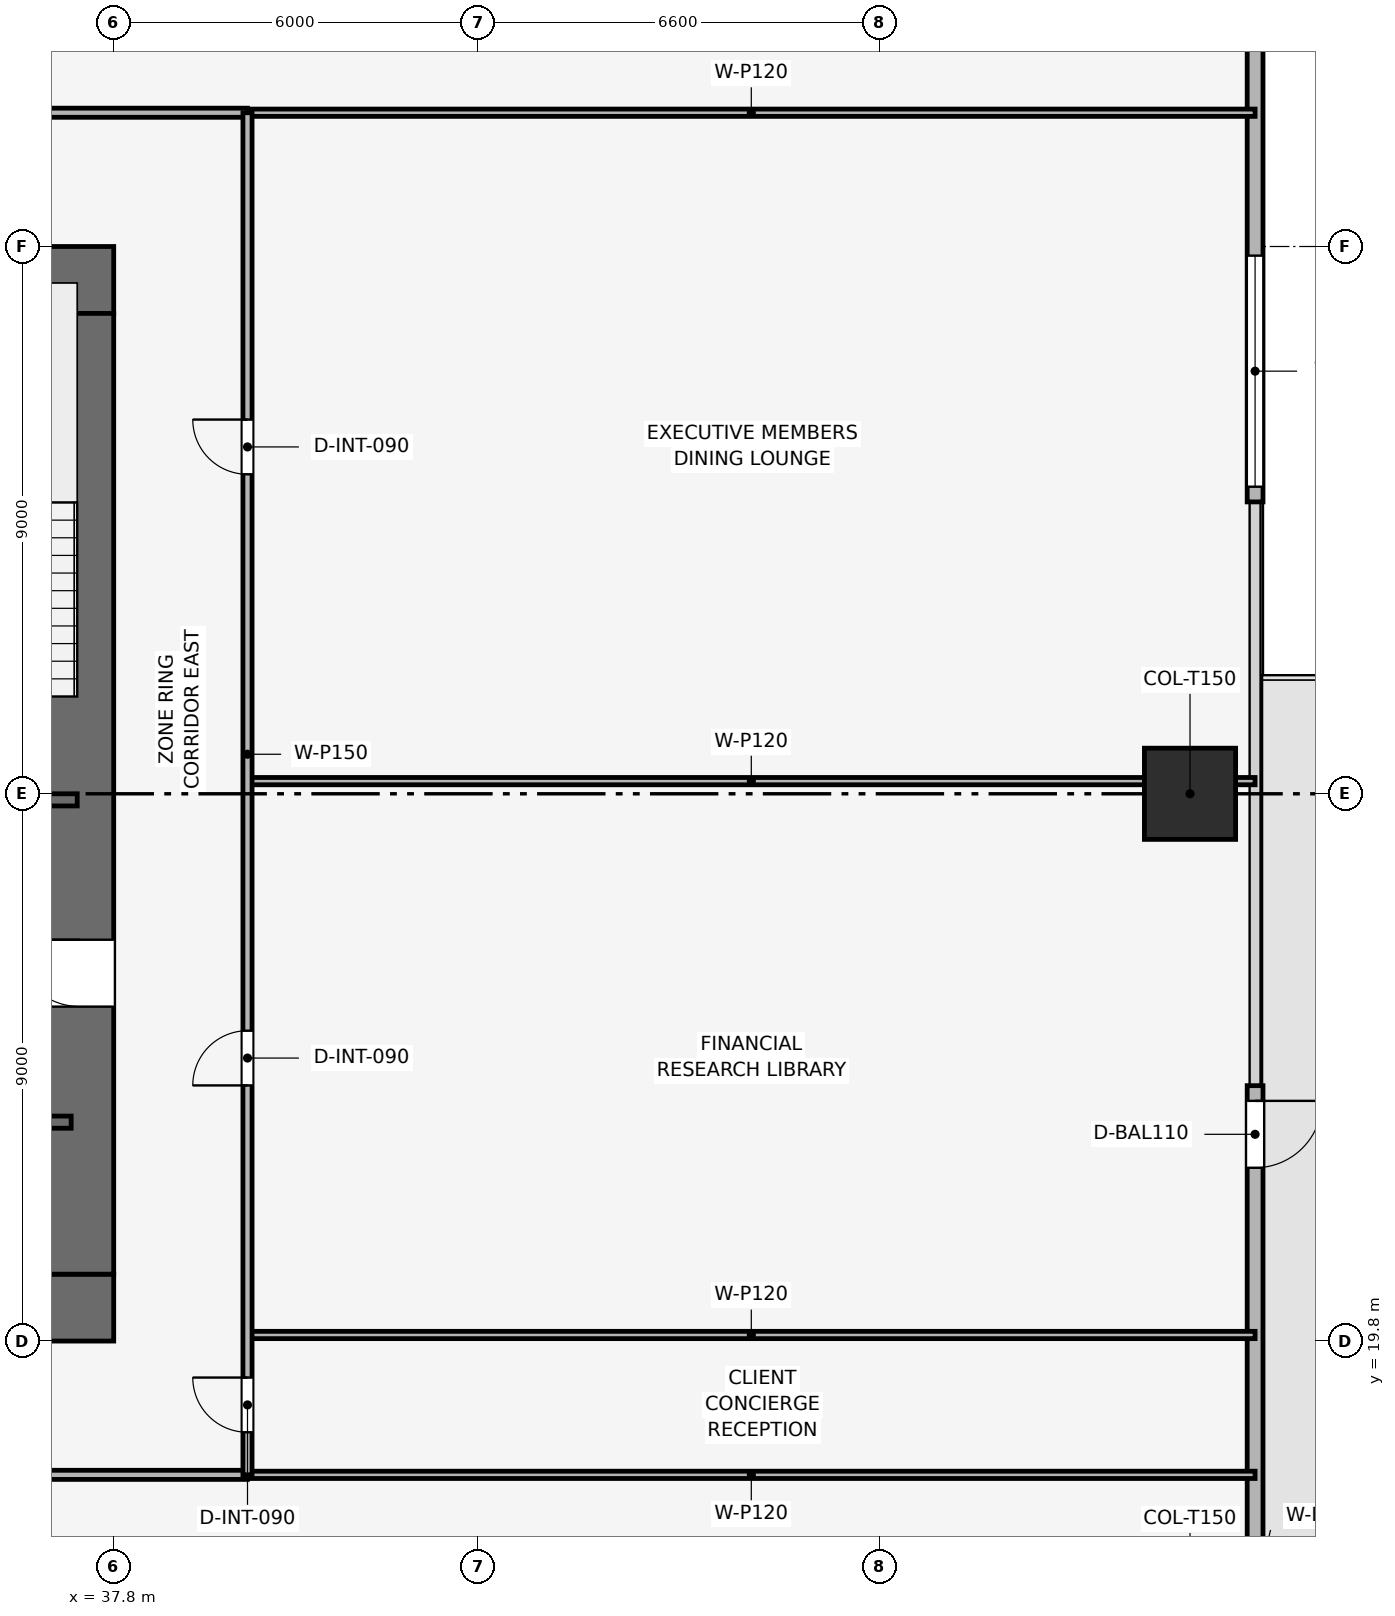
"""IFC4 building model, lengths in metres.
Left out: names, types, materials, properties, quantities, classifications, styles, units other than length and angle.
Written with IfcOpenShell. Run it as: python <this file> out.ifc"""

import sys

from ifc_helpers import new_model, si_unit, direction, frame, frame_2d, origin, origin_2d, place, context, subcontext, project, spatial, rectangle, extrude, element, fill, save


model = new_model("IFC4")
c1 = context("Model", 3, precision=1e-05, world=origin(), true_north=direction((0.0, 1.0)))
c2 = subcontext(c1, "Body", "Model", "MODEL_VIEW")
j1 = project(units=[si_unit("LENGTHUNIT", "METRE"), si_unit("PLANEANGLEUNIT", "RADIAN")], contexts=[c1])
p1 = place(None, origin())
s1 = spatial("IfcSite", under=j1, at=p1, CompositionType="ELEMENT")
p2 = place(p1, origin())
s2 = spatial("IfcBuilding", under=s1, at=p2, CompositionType="ELEMENT")
p3 = place(p2, frame((0.0, 0.0, 30.0)))
s3 = spatial("IfcBuildingStorey", under=s2, at=p3, CompositionType="ELEMENT", Elevation=30.0)
p4 = place(p3, frame((19.8, 20.35, 0.0), z_axis=(0.0, 0.0, 1.0), x_axis=(1.0, 0.0, 0.0)))
e1 = element("IfcWall", 1, at=p4, inside=s3, PredefinedType="SHEAR", context=c2, shape_type="SweptSolid", body=[
    extrude(rectangle(XDim=18.0, YDim=1.1, at=frame_2d((9.0, 0.0))), origin(), (0.0, 0.0, 1.0), 3.9),
])
p5 = place(p4, frame((8.4, 0.0, 0.0)))
e2 = element("IfcOpeningElement", 2, at=p5, cuts=e1, PredefinedType="OPENING", context=c2, shape_type="SweptSolid", body=[
    extrude(rectangle(XDim=1.2, YDim=2.2, at=frame_2d((0.6, 1.1))), frame((0.0, 0.56, 0.0), z_axis=(0.0, -1.0, 0.0), x_axis=(1.0, 0.0, 0.0)), (0.0, 0.0, 1.0), 1.12),
])
p6 = place(p3, frame((19.8, 37.25, 0.0), z_axis=(0.0, 0.0, 1.0), x_axis=(1.0, 0.0, 0.0)))
e3 = element("IfcWall", 3, at=p6, inside=s3, PredefinedType="SHEAR", context=c2, shape_type="SweptSolid", body=[
    extrude(rectangle(XDim=18.0, YDim=1.1, at=frame_2d((9.0, 0.0))), origin(), (0.0, 0.0, 1.0), 3.9),
])
p7 = place(p6, frame((7.05, 0.0, 0.0)))
e4 = element("IfcOpeningElement", 4, at=p7, cuts=e3, PredefinedType="OPENING", context=c2, shape_type="SweptSolid", body=[
    extrude(rectangle(XDim=1.1, YDim=2.15, at=frame_2d((0.55, 1.075))), frame((0.0, 0.56, 0.0), z_axis=(0.0, -1.0, 0.0), x_axis=(1.0, 0.0, 0.0)), (0.0, 0.0, 1.0), 1.12),
])
p8 = place(p3, frame((37.25, 20.9, 0.0), z_axis=(0.0, 0.0, 1.0), x_axis=(0.0, 1.0, 0.0)))
e5 = element("IfcWall", 5, at=p8, inside=s3, PredefinedType="SHEAR", context=c2, shape_type="SweptSolid", body=[
    extrude(rectangle(XDim=15.8, YDim=1.1, at=frame_2d((7.9, 0.0))), origin(), (0.0, 0.0, 1.0), 3.9),
])
p9 = place(p8, frame((4.4, 0.0, 0.0)))
e6 = element("IfcOpeningElement", 6, at=p9, cuts=e5, PredefinedType="OPENING", context=c2, shape_type="SweptSolid", body=[
    extrude(rectangle(XDim=1.1, YDim=2.15, at=frame_2d((0.55, 1.075))), frame((0.0, 0.56, 0.0), z_axis=(0.0, -1.0, 0.0), x_axis=(1.0, 0.0, 0.0)), (0.0, 0.0, 1.0), 1.12),
])
p10 = place(p3, frame((55.5, 28.8, 0.003), z_axis=(0.0, 0.0, 1.0), x_axis=(1.0, 0.0, 0.0)))
e7 = element("IfcColumn", 7, at=p10, inside=s3, PredefinedType="COLUMN", context=c2, shape_type="SweptSolid", body=[
    extrude(rectangle(XDim=1.5, YDim=1.5, at=origin_2d()), origin(), (0.0, 0.0, 1.0), 3.644),
])
p11 = place(p3, frame((56.57, 48.9, 0.0), z_axis=(0.0, 0.0, 1.0), x_axis=(0.0, -1.0, 0.0)))
e8 = element("IfcWall", 8, at=p11, inside=s3, PredefinedType="SOLIDWALL", context=c2, shape_type="SweptSolid", body=[
    extrude(rectangle(XDim=15.3, YDim=0.26, at=frame_2d((7.65, 0.0))), origin(), (0.0, 0.0, 1.0), 3.65),
])
p12 = place(p11, frame((11.25, 0.0, 0.9)))
e9 = element("IfcOpeningElement", 9, at=p12, cuts=e8, PredefinedType="OPENING", context=c2, shape_type="SweptSolid", body=[
    extrude(rectangle(XDim=3.8, YDim=1.9, at=frame_2d((1.9, 0.95))), frame((0.0, 0.14, 0.0), z_axis=(0.0, -1.0, 0.0), x_axis=(1.0, 0.0, 0.0)), (0.0, 0.0, 1.0), 0.28),
])
p13 = place(p3, frame((56.57, 24.0, 0.0), z_axis=(0.0, 0.0, 1.0), x_axis=(0.0, -1.0, 0.0)))
e10 = element("IfcWall", 10, at=p13, inside=s3, PredefinedType="SOLIDWALL", context=c2, shape_type="SweptSolid", body=[
    extrude(rectangle(XDim=15.3, YDim=0.26, at=frame_2d((7.65, 0.0))), origin(), (0.0, 0.0, 1.0), 3.65),
])
p14 = place(p13, frame((0.25, 0.0, 0.0)))
e11 = element("IfcOpeningElement", 11, at=p14, cuts=e10, PredefinedType="OPENING", context=c2, shape_type="SweptSolid", body=[
    extrude(rectangle(XDim=1.1, YDim=2.2, at=frame_2d((0.55, 1.1))), frame((0.0, 0.14, 0.0), z_axis=(0.0, -1.0, 0.0), x_axis=(1.0, 0.0, 0.0)), (0.0, 0.0, 1.0), 0.28),
])
p15 = place(p3, frame((34.05, 28.7, 0.0), z_axis=(0.0, 0.0, 1.0), x_axis=(1.0, 0.0, 0.0)))
e12 = element("IfcWall", 12, at=p15, inside=s3, PredefinedType="SHEAR", context=c2, shape_type="SweptSolid", body=[
    extrude(rectangle(XDim=3.15, YDim=0.2, at=frame_2d((1.575, 0.0))), origin(), (0.0, 0.0, 1.0), 3.65),
])
p16 = place(p15, frame((0.8, 0.0, 0.0)))
e13 = element("IfcOpeningElement", 13, at=p16, cuts=e12, PredefinedType="OPENING", context=c2, shape_type="SweptSolid", body=[
    extrude(rectangle(XDim=1.0, YDim=2.1, at=frame_2d((0.5, 1.05))), frame((0.0, 0.11, 0.0), z_axis=(0.0, -1.0, 0.0), x_axis=(1.0, 0.0, 0.0)), (0.0, 0.0, 1.0), 0.22),
])
p17 = place(p3, frame((34.05, 23.4, 0.0), z_axis=(0.0, 0.0, 1.0), x_axis=(1.0, 0.0, 0.0)))
e14 = element("IfcWall", 14, at=p17, inside=s3, PredefinedType="SHEAR", context=c2, shape_type="SweptSolid", body=[
    extrude(rectangle(XDim=3.05, YDim=0.2, at=frame_2d((1.525, 0.0))), origin(), (0.0, 0.0, 1.0), 3.65),
])
p18 = place(p17, frame((1.2, 0.0, 0.0)))
e15 = element("IfcOpeningElement", 15, at=p18, cuts=e14, PredefinedType="OPENING", context=c2, shape_type="SweptSolid", body=[
    extrude(rectangle(XDim=1.1, YDim=2.15, at=frame_2d((0.55, 1.075))), frame((0.0, 0.11, 0.0), z_axis=(0.0, -1.0, 0.0), x_axis=(1.0, 0.0, 0.0)), (0.0, 0.0, 1.0), 0.22),
])
for number, where, z_axis, x_axis in (
    (16, (40.0, 17.6, 0.0), (0.0, 0.0, 1.0), (1.0, 0.0, 0.0)),
    (17, (40.0, 40.0, 0.0), (0.0, 0.0, 1.0), (1.0, 0.0, 0.0)),
    (18, (40.0, 19.9, 0.0), (0.0, 0.0, 1.0), (1.0, 0.0, 0.0)),
    (19, (40.0, 29.008, 0.0), (0.0, 0.0, 1.0), (1.0, 0.0, 0.0)),
):
    element("IfcWall", number, at=place(p3, frame(where, z_axis=z_axis, x_axis=x_axis)), inside=s3, PredefinedType="PARTITIONING", context=c2, shape_type="SweptSolid", body=[
        extrude(rectangle(XDim=16.57, YDim=0.12, at=frame_2d((8.285, 0.0))), origin(), (0.0, 0.0, 1.0), 2.935),
    ])
p19 = place(p3, frame((17.6, 17.6, 0.0), z_axis=(0.0, 0.0, 1.0), x_axis=(1.0, 0.0, 0.0)))
e20 = element("IfcWall", 20, at=p19, inside=s3, PredefinedType="PARTITIONING", context=c2, shape_type="SweptSolid", body=[
    extrude(rectangle(XDim=22.4, YDim=0.15, at=frame_2d((11.2, 0.0))), origin(), (0.0, 0.0, 1.0), 3.085),
])
p20 = place(p19, frame((10.75, 0.0, 0.0)))
e21 = element("IfcOpeningElement", 21, at=p20, cuts=e20, PredefinedType="OPENING", context=c2, shape_type="SweptSolid", body=[
    extrude(rectangle(XDim=0.9, YDim=2.1, at=frame_2d((0.45, 1.05))), frame((0.0, 0.085, 0.0), z_axis=(0.0, -1.0, 0.0), x_axis=(1.0, 0.0, 0.0)), (0.0, 0.0, 1.0), 0.17),
])
p21 = place(p3, frame((17.6, 40.0, 0.0), z_axis=(0.0, 0.0, 1.0), x_axis=(1.0, 0.0, 0.0)))
e22 = element("IfcWall", 22, at=p21, inside=s3, PredefinedType="PARTITIONING", context=c2, shape_type="SweptSolid", body=[
    extrude(rectangle(XDim=22.4, YDim=0.15, at=frame_2d((11.2, 0.0))), origin(), (0.0, 0.0, 1.0), 3.085),
])
p22 = place(p21, frame((4.349, 0.0, 0.0)))
e23 = element("IfcOpeningElement", 23, at=p22, cuts=e22, PredefinedType="OPENING", context=c2, shape_type="SweptSolid", body=[
    extrude(rectangle(XDim=0.9, YDim=2.1, at=frame_2d((0.45, 1.05))), frame((0.0, 0.085, 0.0), z_axis=(0.0, -1.0, 0.0), x_axis=(1.0, 0.0, 0.0)), (0.0, 0.0, 1.0), 0.17),
])
p23 = place(p21, frame((15.549, 0.0, 0.0)))
e24 = element("IfcOpeningElement", 24, at=p23, cuts=e22, PredefinedType="OPENING", context=c2, shape_type="SweptSolid", body=[
    extrude(rectangle(XDim=0.9, YDim=2.1, at=frame_2d((0.45, 1.05))), frame((0.0, 0.085, 0.0), z_axis=(0.0, -1.0, 0.0), x_axis=(1.0, 0.0, 0.0)), (0.0, 0.0, 1.0), 0.17),
])
p24 = place(p3, frame((40.0, 17.6, 0.0), z_axis=(0.0, 0.0, 1.0), x_axis=(0.0, 1.0, 0.0)))
e25 = element("IfcWall", 25, at=p24, inside=s3, PredefinedType="PARTITIONING", context=c2, shape_type="SweptSolid", body=[
    extrude(rectangle(XDim=22.4, YDim=0.15, at=frame_2d((11.2, 0.0))), origin(), (0.0, 0.0, 1.0), 3.085),
])
p25 = place(p24, frame((0.7, 0.0, 0.0)))
e26 = element("IfcOpeningElement", 26, at=p25, cuts=e25, PredefinedType="OPENING", context=c2, shape_type="SweptSolid", body=[
    extrude(rectangle(XDim=0.9, YDim=2.1, at=frame_2d((0.45, 1.05))), frame((0.0, 0.085, 0.0), z_axis=(0.0, -1.0, 0.0), x_axis=(1.0, 0.0, 0.0)), (0.0, 0.0, 1.0), 0.17),
])
p26 = place(p24, frame((6.404, 0.0, 0.0)))
e27 = element("IfcOpeningElement", 27, at=p26, cuts=e25, PredefinedType="OPENING", context=c2, shape_type="SweptSolid", body=[
    extrude(rectangle(XDim=0.9, YDim=2.1, at=frame_2d((0.45, 1.05))), frame((0.0, 0.085, 0.0), z_axis=(0.0, -1.0, 0.0), x_axis=(1.0, 0.0, 0.0)), (0.0, 0.0, 1.0), 0.17),
])
p27 = place(p24, frame((16.454, 0.0, 0.0)))
e28 = element("IfcOpeningElement", 28, at=p27, cuts=e25, PredefinedType="OPENING", context=c2, shape_type="SweptSolid", body=[
    extrude(rectangle(XDim=0.9, YDim=2.1, at=frame_2d((0.45, 1.05))), frame((0.0, 0.085, 0.0), z_axis=(0.0, -1.0, 0.0), x_axis=(1.0, 0.0, 0.0)), (0.0, 0.0, 1.0), 0.17),
])
p28 = place(p14, origin())
e29 = element("IfcDoor", 29, at=p28, inside=s3, OperationType="SINGLE_SWING_LEFT", PredefinedType="DOOR", context=c2, shape_type="SweptSolid", body=[
    extrude(rectangle(XDim=1.1, YDim=2.2, at=frame_2d((0.55, 1.1))), frame((0.0, 0.025, 0.0), z_axis=(0.0, -1.0, 0.0), x_axis=(1.0, 0.0, 0.0)), (0.0, 0.0, 1.0), 0.05),
])
fill(e11, e29)
p29 = place(p12, origin())
e30 = element("IfcWindow", 30, at=p29, inside=s3, PartitioningType="SINGLE_PANEL", PredefinedType="WINDOW", context=c2, shape_type="SweptSolid", body=[
    extrude(rectangle(XDim=3.8, YDim=1.9, at=frame_2d((1.9, 0.95))), frame((0.0, 0.03, 0.0), z_axis=(0.0, -1.0, 0.0), x_axis=(1.0, 0.0, 0.0)), (0.0, 0.0, 1.0), 0.06),
])
fill(e9, e30)
p30 = place(p25, origin())
e31 = element("IfcDoor", 31, at=p30, inside=s3, OperationType="SINGLE_SWING_RIGHT", PredefinedType="DOOR", context=c2, shape_type="SweptSolid", body=[
    extrude(rectangle(XDim=0.9, YDim=2.1, at=frame_2d((0.45, 1.05))), frame((0.0, 0.025, 0.0), z_axis=(0.0, -1.0, 0.0), x_axis=(1.0, 0.0, 0.0)), (0.0, 0.0, 1.0), 0.05),
])
fill(e26, e31)
p31 = place(p26, origin())
e32 = element("IfcDoor", 32, at=p31, inside=s3, OperationType="SINGLE_SWING_LEFT", PredefinedType="DOOR", context=c2, shape_type="SweptSolid", body=[
    extrude(rectangle(XDim=0.9, YDim=2.1, at=frame_2d((0.45, 1.05))), frame((0.0, 0.025, 0.0), z_axis=(0.0, -1.0, 0.0), x_axis=(1.0, 0.0, 0.0)), (0.0, 0.0, 1.0), 0.05),
])
fill(e27, e32)
p32 = place(p27, origin())
e33 = element("IfcDoor", 33, at=p32, inside=s3, OperationType="SINGLE_SWING_RIGHT", PredefinedType="DOOR", context=c2, shape_type="SweptSolid", body=[
    extrude(rectangle(XDim=0.9, YDim=2.1, at=frame_2d((0.45, 1.05))), frame((0.0, 0.025, 0.0), z_axis=(0.0, -1.0, 0.0), x_axis=(1.0, 0.0, 0.0)), (0.0, 0.0, 1.0), 0.05),
])
fill(e28, e33)
p33 = place(p9, origin())
e34 = element("IfcDoor", 34, at=p33, inside=s3, OperationType="SINGLE_SWING_RIGHT", PredefinedType="DOOR", context=c2, shape_type="SweptSolid", body=[
    extrude(rectangle(XDim=1.1, YDim=2.15, at=frame_2d((0.55, 1.075))), frame((0.0, 0.025, 0.0), z_axis=(0.0, -1.0, 0.0), x_axis=(1.0, 0.0, 0.0)), (0.0, 0.0, 1.0), 0.05),
])
fill(e6, e34)
save(model, sys.argv[1])
